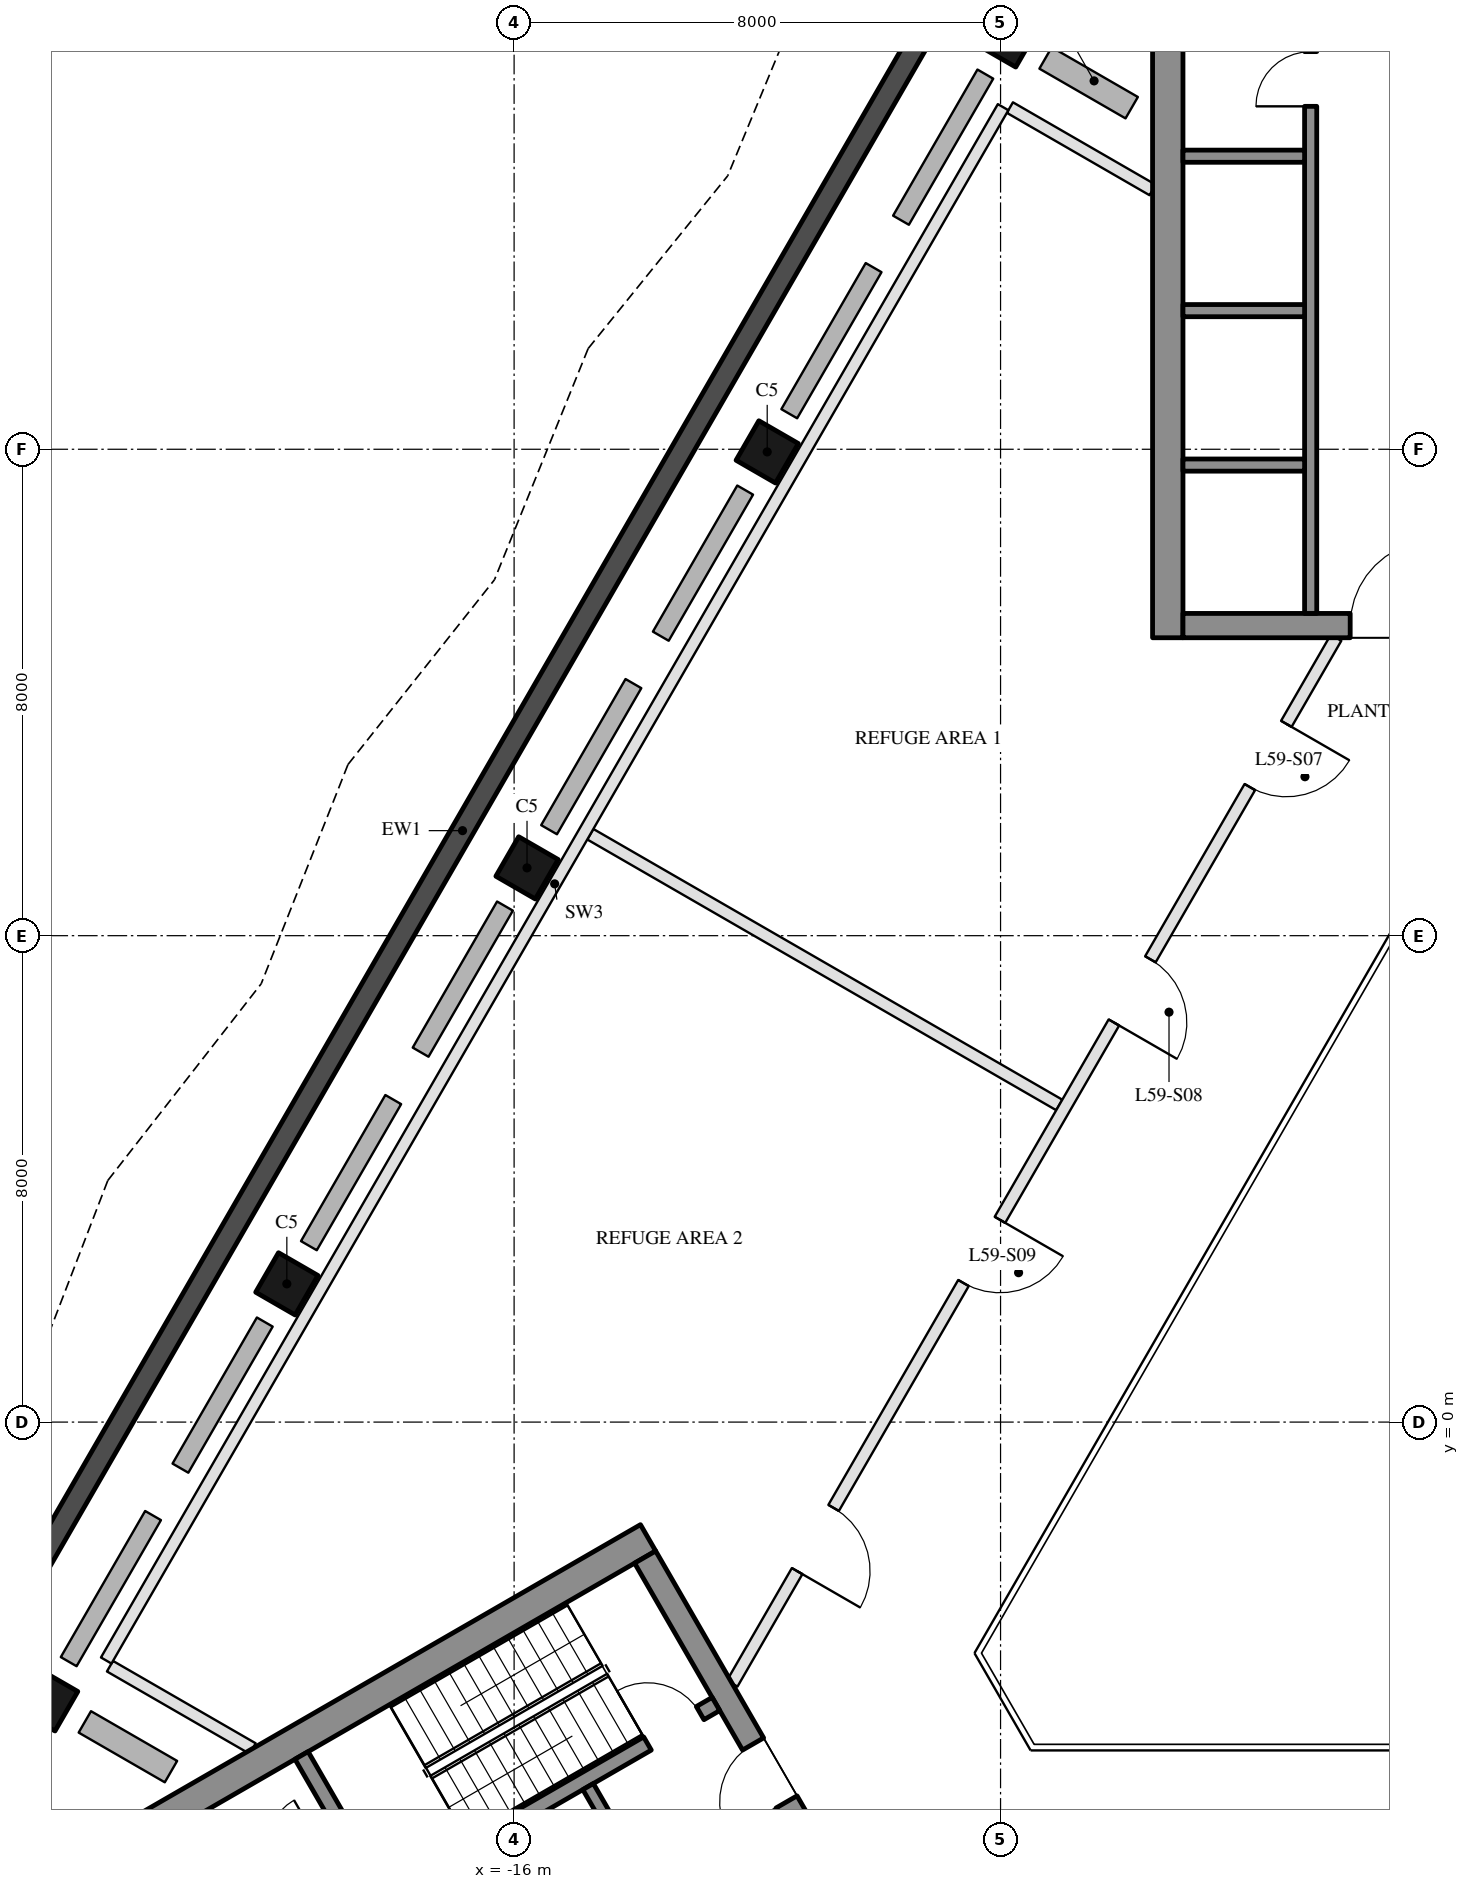
"""IFC4 building model, lengths in metres.
Left out: names, types, materials, properties, quantities, classifications, styles, units other than length and angle.
Written with IfcOpenShell. Run it as: python <this file> out.ifc"""

import sys

from ifc_helpers import new_model, si_unit, direction, frame, frame_2d, origin, origin_2d, place, context, subcontext, project, spatial, rectangle, hollow_rectangle, extrude, element, fill, save


model = new_model("IFC4")
c1 = context("Model", 3, precision=1e-05, world=origin(), true_north=direction((0.0, 1.0)))
c2 = subcontext(c1, "Body", "Model", "MODEL_VIEW")
j1 = project(units=[si_unit("LENGTHUNIT", "METRE"), si_unit("PLANEANGLEUNIT", "RADIAN")], contexts=[c1])
p1 = place(None, origin())
s1 = spatial("IfcSite", under=j1, at=p1, CompositionType="ELEMENT")
p2 = place(p1, origin())
s2 = spatial("IfcBuilding", under=s1, at=p2, CompositionType="ELEMENT")
p3 = place(p2, frame((0.0, 0.0, 242.2)))
s3 = spatial("IfcBuildingStorey", under=s2, at=p3, CompositionType="ELEMENT", Elevation=242.2)
for number, where, z_axis, x_axis in (
    (1, (-7.888, 22.798, 0.0), (0.0, 0.0, 1.0), (0.5, 0.866, 0.0)),
    (2, (-11.838, 15.957, 0.0), (0.0, 0.0, 1.0), (0.5, 0.866, 0.0)),
    (3, (-15.788, 9.115, 0.0), (0.0, 0.0, 1.0), (0.5, 0.866, 0.0)),
    (4, (-19.738, 2.273, 0.0), (0.0, 0.0, 1.0), (0.5, 0.866, 0.0)),
    (5, (-23.688, -4.568, 0.0), (0.0, 0.0, 1.0), (0.5, 0.866, 0.0)),
):
    element("IfcColumn", number, at=place(p3, frame(where, z_axis=z_axis, x_axis=x_axis)), inside=s3, PredefinedType="COLUMN", context=c2, shape_type="SweptSolid", body=[
        extrude(hollow_rectangle(XDim=0.75, YDim=0.75, WallThickness=0.035, at=origin_2d()), origin(), (0.0, 0.0, 1.0), 4.5),
    ])
p4 = place(p3, frame((-7.441, 26.022, 0.0), z_axis=(0.0, 0.0, 1.0), x_axis=(-0.499998380999, -0.866026338513, 0.0)))
e6 = element("IfcWall", 6, at=p4, inside=s3, PredefinedType="SOLIDWALL", context=c2, shape_type="SweptSolid", body=[
    extrude(rectangle(XDim=37.631, YDim=0.35, at=frame_2d((18.816, 0.0))), origin(), (0.0, 0.0, 1.0), 4.35),
])
p5 = place(p3, frame((-5.25, 12.9, 0.0), z_axis=(0.0, 0.0, 1.0), x_axis=(0.0, 1.0, 0.0)))
e7 = element("IfcWall", 7, at=p5, inside=s3, PredefinedType="SHEAR", context=c2, shape_type="SweptSolid", body=[
    extrude(rectangle(XDim=14.837, YDim=0.5, at=frame_2d((7.418, 0.0))), origin(), (0.0, 0.0, 1.0), 4.3),
])
p6 = place(p3, frame((5.0, 13.1, 0.0), z_axis=(0.0, 0.0, 1.0), x_axis=(-1.0, 0.0, 0.0)))
e8 = element("IfcWall", 8, at=p6, inside=s3, PredefinedType="SHEAR", context=c2, shape_type="SweptSolid", body=[
    extrude(rectangle(XDim=10.0, YDim=0.4, at=frame_2d((5.0, 0.0))), origin(), (0.0, 0.0, 1.0), 4.3),
])
p7 = place(p6, frame((3.55, 0.0, 0.0)))
e9 = element("IfcOpeningElement", 9, at=p7, cuts=e8, PredefinedType="OPENING", context=c2, shape_type="SweptSolid", body=[
    extrude(rectangle(XDim=1.1, YDim=2.1, at=frame_2d((0.55, 1.05))), frame((0.0, 0.21, 0.0), z_axis=(0.0, -1.0, 0.0), x_axis=(1.0, 0.0, 0.0)), (0.0, 0.0, 1.0), 0.42),
])
p8 = place(p6, frame((5.85, 0.0, 0.0)))
e10 = element("IfcOpeningElement", 10, at=p8, cuts=e8, PredefinedType="OPENING", context=c2, shape_type="SweptSolid", body=[
    extrude(rectangle(XDim=1.4, YDim=2.1, at=frame_2d((0.7, 1.05))), frame((0.0, 0.21, 0.0), z_axis=(0.0, -1.0, 0.0), x_axis=(1.0, 0.0, 0.0)), (0.0, 0.0, 1.0), 0.42),
])
p9 = place(p3, frame((-2.9, 13.3, 0.0), z_axis=(0.0, 0.0, 1.0), x_axis=(0.0, 1.0, 0.0)))
e11 = element("IfcWall", 11, at=p9, inside=s3, PredefinedType="SHEAR", context=c2, shape_type="SweptSolid", body=[
    extrude(rectangle(XDim=10.16, YDim=0.2, at=frame_2d((5.08, 0.0))), origin(), (0.0, 0.0, 1.0), 4.3),
])
p10 = place(p9, frame((8.34, 0.0, 0.0)))
e12 = element("IfcOpeningElement", 12, at=p10, cuts=e11, PredefinedType="OPENING", context=c2, shape_type="SweptSolid", body=[
    extrude(rectangle(XDim=0.9, YDim=2.1, at=frame_2d((0.45, 1.05))), frame((0.0, 0.11, 0.0), z_axis=(0.0, -1.0, 0.0), x_axis=(1.0, 0.0, 0.0)), (0.0, 0.0, 1.0), 0.22),
])
for number, where, z_axis, x_axis in (
    (13, (-3.0, 15.74, 0.0), (0.0, 0.0, 1.0), (-1.0, 0.0, 0.0)),
    (14, (-3.0, 18.28, 0.0), (0.0, 0.0, 1.0), (-1.0, 0.0, 0.0)),
    (15, (-3.0, 20.82, 0.0), (0.0, 0.0, 1.0), (-1.0, 0.0, 0.0)),
):
    element("IfcWall", number, at=place(p3, frame(where, z_axis=z_axis, x_axis=x_axis)), inside=s3, PredefinedType="SHEAR", context=c2, shape_type="SweptSolid", body=[
        extrude(rectangle(XDim=2.0, YDim=0.2, at=frame_2d((1.0, 0.0))), origin(), (0.0, 0.0, 1.0), 4.3),
    ])
p11 = place(p3, frame((-13.797, -1.903, 0.0), z_axis=(0.0, 0.0, 1.0), x_axis=(-0.866025009528, -0.500000682871, 0.0)))
e16 = element("IfcWall", 16, at=p11, inside=s3, PredefinedType="SHEAR", context=c2, shape_type="SweptSolid", body=[
    extrude(rectangle(XDim=14.837, YDim=0.5, at=frame_2d((7.418, 0.0))), origin(), (0.0, 0.0, 1.0), 4.3),
])
p12 = place(p3, frame((-13.845, -2.22, 0.0), z_axis=(0.0, 0.0, 1.0), x_axis=(0.500004234368, -0.866022959057, 0.0)))
e17 = element("IfcWall", 17, at=p12, inside=s3, PredefinedType="SHEAR", context=c2, shape_type="SweptSolid", body=[
    extrude(rectangle(XDim=10.0, YDim=0.4, at=frame_2d((5.0, 0.0))), origin(), (0.0, 0.0, 1.0), 4.3),
])
p13 = place(p12, frame((3.55, 0.0, 0.0)))
e18 = element("IfcOpeningElement", 18, at=p13, cuts=e17, PredefinedType="OPENING", context=c2, shape_type="SweptSolid", body=[
    extrude(rectangle(XDim=1.1, YDim=2.1, at=frame_2d((0.55, 1.05))), frame((0.0, 0.21, 0.0), z_axis=(0.0, -1.0, 0.0), x_axis=(1.0, 0.0, 0.0)), (0.0, 0.0, 1.0), 0.42),
])
p14 = place(p12, frame((5.85, 0.0, 0.0)))
e19 = element("IfcOpeningElement", 19, at=p14, cuts=e17, PredefinedType="OPENING", context=c2, shape_type="SweptSolid", body=[
    extrude(rectangle(XDim=1.4, YDim=2.1, at=frame_2d((0.7, 1.05))), frame((0.0, 0.21, 0.0), z_axis=(0.0, -1.0, 0.0), x_axis=(1.0, 0.0, 0.0)), (0.0, 0.0, 1.0), 0.42),
])
p15 = place(p3, frame((-12.681, -4.636, 0.0), z_axis=(0.0, 0.0, 1.0), x_axis=(-0.866021702275, -0.500006411147, 0.0)))
e20 = element("IfcWall", 20, at=p15, inside=s3, PredefinedType="SHEAR", context=c2, shape_type="SweptSolid", body=[
    extrude(rectangle(XDim=6.45, YDim=0.25, at=frame_2d((3.225, 0.0))), origin(), (0.0, 0.0, 1.0), 4.3),
])
p16 = place(p15, frame((0.3, 0.0, 0.0)))
e21 = element("IfcOpeningElement", 21, at=p16, cuts=e20, PredefinedType="OPENING", context=c2, shape_type="SweptSolid", body=[
    extrude(rectangle(XDim=1.0, YDim=2.1, at=frame_2d((0.5, 1.05))), frame((0.0, 0.135, 0.0), z_axis=(0.0, -1.0, 0.0), x_axis=(1.0, 0.0, 0.0)), (0.0, 0.0, 1.0), 0.27),
])
p17 = place(p3, frame((-19.496, -5.482, 0.0), z_axis=(0.0, 0.0, 1.0), x_axis=(0.499990435942, -0.866030925526, 0.0)))
e22 = element("IfcWall", 22, at=p17, inside=s3, PredefinedType="SHEAR", context=c2, shape_type="SweptSolid", body=[
    extrude(rectangle(XDim=2.55, YDim=0.25, at=frame_2d((1.275, 0.0))), origin(), (0.0, 0.0, 1.0), 4.3),
])
p18 = place(p3, frame((-14.783, -5.995, 0.0), z_axis=(0.0, 0.0, 1.0), x_axis=(0.49994636267, -0.866056369097, 0.0)))
e23 = element("IfcWall", 23, at=p18, inside=s3, PredefinedType="SHEAR", context=c2, shape_type="SweptSolid", body=[
    extrude(rectangle(XDim=2.8, YDim=0.2, at=frame_2d((1.4, 0.0))), origin(), (0.0, 0.0, 1.0), 4.3),
])
p19 = place(p18, frame((0.7, 0.0, 0.0)))
e24 = element("IfcOpeningElement", 24, at=p19, cuts=e23, PredefinedType="OPENING", context=c2, shape_type="SweptSolid", body=[
    extrude(rectangle(XDim=1.2, YDim=2.1, at=frame_2d((0.6, 1.05))), frame((0.0, 0.11, 0.0), z_axis=(0.0, -1.0, 0.0), x_axis=(1.0, 0.0, 0.0)), (0.0, 0.0, 1.0), 0.22),
])
p20 = place(p3, frame((-21.076, -6.395, 0.0), z_axis=(0.0, 0.0, 1.0), x_axis=(0.50001468107, -0.866016927499, 0.0)))
e25 = element("IfcWall", 25, at=p20, inside=s3, PredefinedType="PARTITIONING", context=c2, shape_type="SweptSolid", body=[
    extrude(rectangle(XDim=5.4, YDim=0.2, at=frame_2d((2.7, 0.0))), origin(), (0.0, 0.0, 1.0), 4.3),
])
p21 = place(p20, frame((3.05, 0.0, 0.0)))
e26 = element("IfcOpeningElement", 26, at=p21, cuts=e25, PredefinedType="OPENING", context=c2, shape_type="SweptSolid", body=[
    extrude(rectangle(XDim=0.9, YDim=2.1, at=frame_2d((0.45, 1.05))), frame((0.0, 0.11, 0.0), z_axis=(0.0, -1.0, 0.0), x_axis=(1.0, 0.0, 0.0)), (0.0, 0.0, 1.0), 0.22),
])
p22 = place(p3, frame((-7.846, 21.62, 0.0), z_axis=(0.0, 0.0, 1.0), x_axis=(0.866022026288, -0.50000584995, 0.0)))
e27 = element("IfcWall", 27, at=p22, inside=s3, PredefinedType="PARTITIONING", context=c2, shape_type="SweptSolid", body=[
    extrude(rectangle(XDim=2.709, YDim=0.2, at=frame_2d((1.355, 0.0))), origin(), (0.0, 0.0, 1.0), 4.35),
])
p23 = place(p3, frame((-14.746, 9.668, 0.0), z_axis=(0.0, 0.0, 1.0), x_axis=(0.866029443717, -0.499993002566, 0.0)))
e28 = element("IfcWall", 28, at=p23, inside=s3, PredefinedType="PARTITIONING", context=c2, shape_type="SweptSolid", body=[
    extrude(rectangle(XDim=8.905, YDim=0.2, at=frame_2d((4.453, 0.0))), origin(), (0.0, 0.0, 1.0), 4.35),
])
p24 = place(p3, frame((-22.646, -4.015, 0.0), z_axis=(0.0, 0.0, 1.0), x_axis=(0.866044551023, -0.499966834543, 0.0)))
e29 = element("IfcWall", 29, at=p24, inside=s3, PredefinedType="PARTITIONING", context=c2, shape_type="SweptSolid", body=[
    extrude(rectangle(XDim=2.71, YDim=0.2, at=frame_2d((1.355, 0.0))), origin(), (0.0, 0.0, 1.0), 4.35),
])
p25 = place(p3, frame((-7.958, 21.626, 0.0), z_axis=(0.0, 0.0, 1.0), x_axis=(-0.499998500593, -0.866026269466, 0.0)))
e30 = element("IfcWall", 30, at=p25, inside=s3, PredefinedType="PARTITIONING", context=c2, shape_type="SweptSolid", body=[
    extrude(rectangle(XDim=29.5, YDim=0.2, at=frame_2d((14.75, 0.0))), origin(), (0.0, 0.0, 1.0), 3.75),
])
p26 = place(p3, frame((-2.482, 12.9, 0.0), z_axis=(0.0, 0.0, 1.0), x_axis=(-0.50000478328, -0.866022642139, 0.0)))
e31 = element("IfcWall", 31, at=p26, inside=s3, PredefinedType="PARTITIONING", context=c2, shape_type="SweptSolid", body=[
    extrude(rectangle(XDim=19.861, YDim=0.2, at=frame_2d((9.931, 0.0))), origin(), (0.0, 0.0, 1.0), 3.75),
])
p27 = place(p26, frame((1.635, 0.0, 0.0)))
e32 = element("IfcOpeningElement", 32, at=p27, cuts=e31, PredefinedType="OPENING", context=c2, shape_type="SweptSolid", body=[
    extrude(rectangle(XDim=1.2, YDim=2.1, at=frame_2d((0.6, 1.05))), frame((0.0, 0.11, 0.0), z_axis=(0.0, -1.0, 0.0), x_axis=(1.0, 0.0, 0.0)), (0.0, 0.0, 1.0), 0.22),
])
p28 = place(p26, frame((6.107, 0.0, 0.0)))
e33 = element("IfcOpeningElement", 33, at=p28, cuts=e31, PredefinedType="OPENING", context=c2, shape_type="SweptSolid", body=[
    extrude(rectangle(XDim=1.2, YDim=2.1, at=frame_2d((0.6, 1.05))), frame((0.0, 0.11, 0.0), z_axis=(0.0, -1.0, 0.0), x_axis=(1.0, 0.0, 0.0)), (0.0, 0.0, 1.0), 0.22),
])
p29 = place(p26, frame((11.054, 0.0, 0.0)))
e34 = element("IfcOpeningElement", 34, at=p29, cuts=e31, PredefinedType="OPENING", context=c2, shape_type="SweptSolid", body=[
    extrude(rectangle(XDim=1.2, YDim=2.1, at=frame_2d((0.6, 1.05))), frame((0.0, 0.11, 0.0), z_axis=(0.0, -1.0, 0.0), x_axis=(1.0, 0.0, 0.0)), (0.0, 0.0, 1.0), 0.22),
])
p30 = place(p26, frame((16.526, 0.0, 0.0)))
e35 = element("IfcOpeningElement", 35, at=p30, cuts=e31, PredefinedType="OPENING", context=c2, shape_type="SweptSolid", body=[
    extrude(rectangle(XDim=1.2, YDim=2.1, at=frame_2d((0.6, 1.05))), frame((0.0, 0.11, 0.0), z_axis=(0.0, -1.0, 0.0), x_axis=(1.0, 0.0, 0.0)), (0.0, 0.0, 1.0), 0.22),
])
p31 = place(p10, origin())
e36 = element("IfcDoor", 36, at=p31, inside=s3, OperationType="SINGLE_SWING_LEFT", PredefinedType="DOOR", context=c2, shape_type="SweptSolid", body=[
    extrude(rectangle(XDim=0.9, YDim=2.1, at=frame_2d((0.45, 1.05))), frame((0.0, 0.025, 0.0), z_axis=(0.0, -1.0, 0.0), x_axis=(1.0, 0.0, 0.0)), (0.0, 0.0, 1.0), 0.05),
])
fill(e12, e36)
p32 = place(p8, frame((1.4, 0.0, 0.0), z_axis=(0.0, 0.0, 1.0), x_axis=(-1.0, 0.0, 0.0)))
e37 = element("IfcDoor", 37, at=p32, inside=s3, OperationType="DOUBLE_DOOR_SINGLE_SWING", PredefinedType="DOOR", context=c2, shape_type="SweptSolid", body=[
    extrude(rectangle(XDim=1.4, YDim=2.1, at=frame_2d((0.7, 1.05))), frame((0.0, 0.025, 0.0), z_axis=(0.0, -1.0, 0.0), x_axis=(1.0, 0.0, 0.0)), (0.0, 0.0, 1.0), 0.05),
])
fill(e10, e37)
p33 = place(p13, frame((1.1, 0.0, 0.0), z_axis=(0.0, 0.0, 1.0), x_axis=(-1.0, 0.0, 0.0)))
e38 = element("IfcDoor", 38, at=p33, inside=s3, OperationType="SINGLE_SWING_LEFT", PredefinedType="DOOR", context=c2, shape_type="SweptSolid", body=[
    extrude(rectangle(XDim=1.1, YDim=2.1, at=frame_2d((0.55, 1.05))), frame((0.0, 0.025, 0.0), z_axis=(0.0, -1.0, 0.0), x_axis=(1.0, 0.0, 0.0)), (0.0, 0.0, 1.0), 0.05),
])
fill(e18, e38)
p34 = place(p16, frame((1.0, 0.0, 0.0), z_axis=(0.0, 0.0, 1.0), x_axis=(-1.0, 0.0, 0.0)))
e39 = element("IfcDoor", 39, at=p34, inside=s3, OperationType="SINGLE_SWING_LEFT", PredefinedType="DOOR", context=c2, shape_type="SweptSolid", body=[
    extrude(rectangle(XDim=1.0, YDim=2.1, at=frame_2d((0.5, 1.05))), frame((0.0, 0.025, 0.0), z_axis=(0.0, -1.0, 0.0), x_axis=(1.0, 0.0, 0.0)), (0.0, 0.0, 1.0), 0.05),
])
fill(e21, e39)
p35 = place(p27, origin())
e40 = element("IfcDoor", 40, at=p35, inside=s3, OperationType="SINGLE_SWING_LEFT", PredefinedType="DOOR", context=c2, shape_type="SweptSolid", body=[
    extrude(rectangle(XDim=1.2, YDim=2.1, at=frame_2d((0.6, 1.05))), frame((0.0, 0.025, 0.0), z_axis=(0.0, -1.0, 0.0), x_axis=(1.0, 0.0, 0.0)), (0.0, 0.0, 1.0), 0.05),
])
fill(e32, e40)
p36 = place(p28, origin())
e41 = element("IfcDoor", 41, at=p36, inside=s3, OperationType="SINGLE_SWING_RIGHT", PredefinedType="DOOR", context=c2, shape_type="SweptSolid", body=[
    extrude(rectangle(XDim=1.2, YDim=2.1, at=frame_2d((0.6, 1.05))), frame((0.0, 0.025, 0.0), z_axis=(0.0, -1.0, 0.0), x_axis=(1.0, 0.0, 0.0)), (0.0, 0.0, 1.0), 0.05),
])
fill(e33, e41)
p37 = place(p29, origin())
e42 = element("IfcDoor", 42, at=p37, inside=s3, OperationType="SINGLE_SWING_LEFT", PredefinedType="DOOR", context=c2, shape_type="SweptSolid", body=[
    extrude(rectangle(XDim=1.2, YDim=2.1, at=frame_2d((0.6, 1.05))), frame((0.0, 0.025, 0.0), z_axis=(0.0, -1.0, 0.0), x_axis=(1.0, 0.0, 0.0)), (0.0, 0.0, 1.0), 0.05),
])
fill(e34, e42)
p38 = place(p30, origin())
e43 = element("IfcDoor", 43, at=p38, inside=s3, OperationType="SINGLE_SWING_RIGHT", PredefinedType="DOOR", context=c2, shape_type="SweptSolid", body=[
    extrude(rectangle(XDim=1.2, YDim=2.1, at=frame_2d((0.6, 1.05))), frame((0.0, 0.025, 0.0), z_axis=(0.0, -1.0, 0.0), x_axis=(1.0, 0.0, 0.0)), (0.0, 0.0, 1.0), 0.05),
])
fill(e35, e43)
save(model, sys.argv[1])
